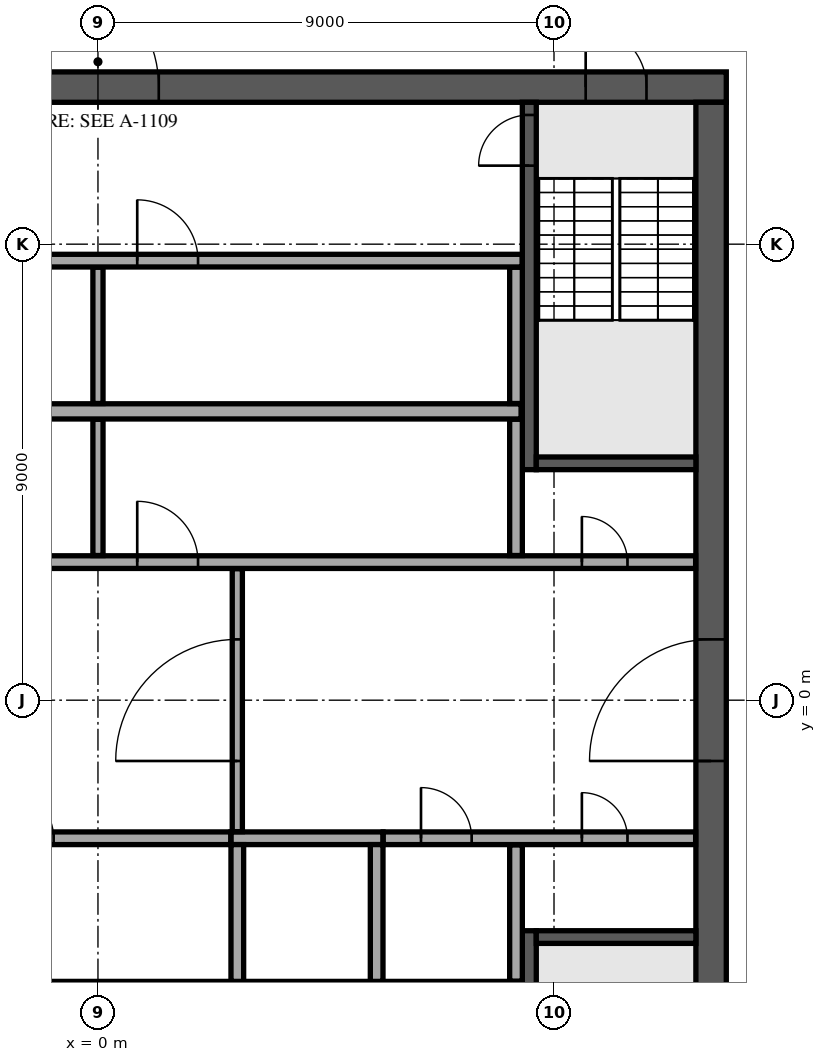
"""IFC4 building model, lengths in metres.
Left out: names, types, materials, properties, quantities, classifications, styles, units other than length and angle.
Written with IfcOpenShell. Run it as: python <this file> out.ifc"""

import sys

from ifc_helpers import new_model, si_unit, direction, frame, frame_2d, origin, place, context, subcontext, project, spatial, rectangle, extrude, element, fill, save


model = new_model("IFC4")
c1 = context("Model", 3, precision=1e-05, world=origin(), true_north=direction((0.0, 1.0)))
c2 = subcontext(c1, "Body", "Model", "MODEL_VIEW")
j1 = project(units=[si_unit("LENGTHUNIT", "METRE"), si_unit("PLANEANGLEUNIT", "RADIAN")], contexts=[c1])
p1 = place(None, origin())
s1 = spatial("IfcSite", under=j1, at=p1, CompositionType="ELEMENT")
p2 = place(p1, origin())
s2 = spatial("IfcBuilding", under=s1, at=p2, CompositionType="ELEMENT")
p3 = place(p2, frame((0.0, 0.0, 350.1)))
s3 = spatial("IfcBuildingStorey", under=s2, at=p3, CompositionType="ELEMENT", Elevation=350.1)
p4 = place(p3, frame((-12.4, 12.1, 0.0), z_axis=(0.0, 0.0, 1.0), x_axis=(1.0, 0.0, 0.0)))
e1 = element("IfcWall", 1, at=p4, inside=s3, PredefinedType="SHEAR", context=c2, shape_type="SweptSolid", body=[
    extrude(rectangle(XDim=24.8, YDim=0.6, at=frame_2d((12.4, 0.0))), origin(), (0.0, 0.0, 1.0), 7.7),
])
p5 = place(p4, frame((11.2, 0.0, 0.0)))
e2 = element("IfcOpeningElement", 2, at=p5, cuts=e1, PredefinedType="OPENING", context=c2, shape_type="SweptSolid", body=[
    extrude(rectangle(XDim=2.4, YDim=2.4, at=frame_2d((1.2, 1.2))), frame((0.0, 0.31, 0.0), z_axis=(0.0, -1.0, 0.0), x_axis=(1.0, 0.0, 0.0)), (0.0, 0.0, 1.0), 0.62),
])
p6 = place(p4, frame((22.025, 0.0, 0.0)))
e3 = element("IfcOpeningElement", 3, at=p6, cuts=e1, PredefinedType="OPENING", context=c2, shape_type="SweptSolid", body=[
    extrude(rectangle(XDim=1.2, YDim=2.1, at=frame_2d((0.6, 1.05))), frame((0.0, 0.31, 0.0), z_axis=(0.0, -1.0, 0.0), x_axis=(1.0, 0.0, 0.0)), (0.0, 0.0, 1.0), 0.62),
])
p7 = place(p4, frame((1.0, 0.0, 0.0)))
e4 = element("IfcOpeningElement", 4, at=p7, cuts=e1, PredefinedType="OPENING", context=c2, shape_type="SweptSolid", body=[
    extrude(rectangle(XDim=1.0, YDim=2.1, at=frame_2d((0.5, 1.05))), frame((0.0, 0.31, 0.0), z_axis=(0.0, -1.0, 0.0), x_axis=(1.0, 0.0, 0.0)), (0.0, 0.0, 1.0), 0.62),
])
p8 = place(p3, frame((12.1, -11.8, 0.0), z_axis=(0.0, 0.0, 1.0), x_axis=(0.0, 1.0, 0.0)))
e5 = element("IfcWall", 5, at=p8, inside=s3, PredefinedType="SHEAR", context=c2, shape_type="SweptSolid", body=[
    extrude(rectangle(XDim=23.6, YDim=0.6, at=frame_2d((11.8, 0.0))), origin(), (0.0, 0.0, 1.0), 7.7),
])
p9 = place(p8, frame((10.6, 0.0, 0.0)))
e6 = element("IfcOpeningElement", 6, at=p9, cuts=e5, PredefinedType="OPENING", context=c2, shape_type="SweptSolid", body=[
    extrude(rectangle(XDim=2.4, YDim=2.4, at=frame_2d((1.2, 1.2))), frame((0.0, 0.31, 0.0), z_axis=(0.0, -1.0, 0.0), x_axis=(1.0, 0.0, 0.0)), (0.0, 0.0, 1.0), 0.62),
])
p10 = place(p3, frame((-2.875, -5.7, 0.0), z_axis=(0.0, 0.0, 1.0), x_axis=(1.0, 0.0, 0.0)))
e7 = element("IfcWall", 7, at=p10, inside=s3, PredefinedType="SOLIDWALL", context=c2, shape_type="SweptSolid", body=[
    extrude(rectangle(XDim=11.25, YDim=0.3, at=frame_2d((5.625, 0.0))), origin(), (0.0, 0.0, 1.0), 7.7),
])
p11 = place(p3, frame((2.625, -2.725, 0.0), z_axis=(0.0, 0.0, 1.0), x_axis=(1.0, 0.0, 0.0)))
e8 = element("IfcWall", 8, at=p11, inside=s3, PredefinedType="SOLIDWALL", context=c2, shape_type="SweptSolid", body=[
    extrude(rectangle(XDim=3.0, YDim=0.25, at=frame_2d((1.5, 0.0))), origin(), (0.0, 0.0, 1.0), 7.7),
])
for number, where, z_axis, x_axis in (
    (9, (2.75, -5.55, 0.0), (0.0, 0.0, 1.0), (0.0, 1.0, 0.0)),
    (10, (5.5, -5.55, 0.0), (0.0, 0.0, 1.0), (0.0, 1.0, 0.0)),
):
    element("IfcWall", number, at=place(p3, frame(where, z_axis=z_axis, x_axis=x_axis)), inside=s3, PredefinedType="SOLIDWALL", context=c2, shape_type="SweptSolid", body=[
        extrude(rectangle(XDim=2.7, YDim=0.25, at=frame_2d((1.35, 0.0))), origin(), (0.0, 0.0, 1.0), 7.7),
    ])
p12 = place(p3, frame((8.512, 4.55, 0.0), z_axis=(0.0, 0.0, 1.0), x_axis=(0.0, 1.0, 0.0)))
e11 = element("IfcWall", 11, at=p12, inside=s3, PredefinedType="SOLIDWALL", context=c2, shape_type="SweptSolid", body=[
    extrude(rectangle(XDim=7.25, YDim=0.275, at=frame_2d((3.625, 0.0))), origin(), (0.0, 0.0, 1.0), 7.7),
])
p13 = place(p12, frame((6.0, 0.0, 0.0)))
e12 = element("IfcOpeningElement", 12, at=p13, cuts=e11, PredefinedType="OPENING", context=c2, shape_type="SweptSolid", body=[
    extrude(rectangle(XDim=1.0, YDim=2.1, at=frame_2d((0.5, 1.05))), frame((0.0, 0.147, 0.0), z_axis=(0.0, -1.0, 0.0), x_axis=(1.0, 0.0, 0.0)), (0.0, 0.0, 1.0), 0.295),
])
p14 = place(p3, frame((8.65, 4.675, 0.0), z_axis=(0.0, 0.0, 1.0), x_axis=(1.0, 0.0, 0.0)))
e13 = element("IfcWall", 13, at=p14, inside=s3, PredefinedType="SOLIDWALL", context=c2, shape_type="SweptSolid", body=[
    extrude(rectangle(XDim=3.15, YDim=0.25, at=frame_2d((1.575, 0.0))), origin(), (0.0, 0.0, 1.0), 7.7),
])
p15 = place(p3, frame((8.512, -4.55, 0.0), z_axis=(0.0, 0.0, 1.0), x_axis=(0.0, -1.0, 0.0)))
e14 = element("IfcWall", 14, at=p15, inside=s3, PredefinedType="SOLIDWALL", context=c2, shape_type="SweptSolid", body=[
    extrude(rectangle(XDim=7.25, YDim=0.275, at=frame_2d((3.625, 0.0))), origin(), (0.0, 0.0, 1.0), 7.7),
])
p16 = place(p15, frame((6.0, 0.0, 0.0)))
e15 = element("IfcOpeningElement", 15, at=p16, cuts=e14, PredefinedType="OPENING", context=c2, shape_type="SweptSolid", body=[
    extrude(rectangle(XDim=1.0, YDim=2.1, at=frame_2d((0.5, 1.05))), frame((0.0, 0.147, 0.0), z_axis=(0.0, -1.0, 0.0), x_axis=(1.0, 0.0, 0.0)), (0.0, 0.0, 1.0), 0.295),
])
p17 = place(p3, frame((8.65, -4.675, 0.0), z_axis=(0.0, 0.0, 1.0), x_axis=(1.0, 0.0, 0.0)))
e16 = element("IfcWall", 16, at=p17, inside=s3, PredefinedType="SOLIDWALL", context=c2, shape_type="SweptSolid", body=[
    extrude(rectangle(XDim=3.15, YDim=0.25, at=frame_2d((1.575, 0.0))), origin(), (0.0, 0.0, 1.0), 7.7),
])
p18 = place(p3, frame((8.25, -5.545, 0.0), z_axis=(0.0, 0.0, 1.0), x_axis=(0.0, 1.0, 0.0)))
e17 = element("IfcWall", 17, at=p18, inside=s3, PredefinedType="PARTITIONING", context=c2, shape_type="SweptSolid", body=[
    extrude(rectangle(XDim=2.69, YDim=0.25, at=frame_2d((1.345, 0.0))), origin(), (0.0, 0.0, 1.0), 7.7),
])
p19 = place(p3, frame((-11.795, -2.725, 0.0), z_axis=(0.0, 0.0, 1.0), x_axis=(1.0, 0.0, 0.0)))
e18 = element("IfcWall", 18, at=p19, inside=s3, PredefinedType="PARTITIONING", context=c2, shape_type="SweptSolid", body=[
    extrude(rectangle(XDim=14.415, YDim=0.25, at=frame_2d((7.208, 0.0))), origin(), (0.0, 0.0, 1.0), 7.7),
])
p20 = place(p19, frame((1.295, 0.0, 0.0)))
e19 = element("IfcOpeningElement", 19, at=p20, cuts=e18, PredefinedType="OPENING", context=c2, shape_type="SweptSolid", body=[
    extrude(rectangle(XDim=1.0, YDim=2.1, at=frame_2d((0.5, 1.05))), frame((0.0, 0.135, 0.0), z_axis=(0.0, -1.0, 0.0), x_axis=(1.0, 0.0, 0.0)), (0.0, 0.0, 1.0), 0.27),
])
p21 = place(p19, frame((4.42, 0.0, 0.0)))
e20 = element("IfcOpeningElement", 20, at=p21, cuts=e18, PredefinedType="OPENING", context=c2, shape_type="SweptSolid", body=[
    extrude(rectangle(XDim=1.0, YDim=2.1, at=frame_2d((0.5, 1.05))), frame((0.0, 0.135, 0.0), z_axis=(0.0, -1.0, 0.0), x_axis=(1.0, 0.0, 0.0)), (0.0, 0.0, 1.0), 0.27),
])
p22 = place(p19, frame((9.92, 0.0, 0.0)))
e21 = element("IfcOpeningElement", 21, at=p22, cuts=e18, PredefinedType="OPENING", context=c2, shape_type="SweptSolid", body=[
    extrude(rectangle(XDim=1.0, YDim=2.1, at=frame_2d((0.5, 1.05))), frame((0.0, 0.135, 0.0), z_axis=(0.0, -1.0, 0.0), x_axis=(1.0, 0.0, 0.0)), (0.0, 0.0, 1.0), 0.27),
])
p23 = place(p3, frame((5.63, -2.725, 0.0), z_axis=(0.0, 0.0, 1.0), x_axis=(1.0, 0.0, 0.0)))
e22 = element("IfcWall", 22, at=p23, inside=s3, PredefinedType="PARTITIONING", context=c2, shape_type="SweptSolid", body=[
    extrude(rectangle(XDim=6.165, YDim=0.25, at=frame_2d((3.083, 0.0))), origin(), (0.0, 0.0, 1.0), 7.7),
])
p24 = place(p23, frame((0.745, 0.0, 0.0)))
e23 = element("IfcOpeningElement", 23, at=p24, cuts=e22, PredefinedType="OPENING", context=c2, shape_type="SweptSolid", body=[
    extrude(rectangle(XDim=1.0, YDim=2.1, at=frame_2d((0.5, 1.05))), frame((0.0, 0.135, 0.0), z_axis=(0.0, -1.0, 0.0), x_axis=(1.0, 0.0, 0.0)), (0.0, 0.0, 1.0), 0.27),
])
p25 = place(p23, frame((3.92, 0.0, 0.0)))
e24 = element("IfcOpeningElement", 24, at=p25, cuts=e22, PredefinedType="OPENING", context=c2, shape_type="SweptSolid", body=[
    extrude(rectangle(XDim=0.9, YDim=2.1, at=frame_2d((0.45, 1.05))), frame((0.0, 0.135, 0.0), z_axis=(0.0, -1.0, 0.0), x_axis=(1.0, 0.0, 0.0)), (0.0, 0.0, 1.0), 0.27),
])
p26 = place(p3, frame((2.75, -2.595, 0.0), z_axis=(0.0, 0.0, 1.0), x_axis=(0.0, 1.0, 0.0)))
e25 = element("IfcWall", 25, at=p26, inside=s3, PredefinedType="PARTITIONING", context=c2, shape_type="SweptSolid", body=[
    extrude(rectangle(XDim=5.19, YDim=0.2, at=frame_2d((2.595, 0.0))), origin(), (0.0, 0.0, 1.0), 7.7),
])
p27 = place(p26, frame((1.395, 0.0, 0.0)))
e26 = element("IfcOpeningElement", 26, at=p27, cuts=e25, PredefinedType="OPENING", context=c2, shape_type="SweptSolid", body=[
    extrude(rectangle(XDim=2.4, YDim=2.4, at=frame_2d((1.2, 1.2))), frame((0.0, 0.11, 0.0), z_axis=(0.0, -1.0, 0.0), x_axis=(1.0, 0.0, 0.0)), (0.0, 0.0, 1.0), 0.22),
])
p28 = place(p3, frame((-11.795, 2.725, 0.0), z_axis=(0.0, 0.0, 1.0), x_axis=(1.0, 0.0, 0.0)))
e27 = element("IfcWall", 27, at=p28, inside=s3, PredefinedType="PARTITIONING", context=c2, shape_type="SweptSolid", body=[
    extrude(rectangle(XDim=23.59, YDim=0.25, at=frame_2d((11.795, 0.0))), origin(), (0.0, 0.0, 1.0), 7.7),
])
p29 = place(p28, frame((21.345, 0.0, 0.0)))
e28 = element("IfcOpeningElement", 28, at=p29, cuts=e27, PredefinedType="OPENING", context=c2, shape_type="SweptSolid", body=[
    extrude(rectangle(XDim=0.9, YDim=2.1, at=frame_2d((0.45, 1.05))), frame((0.0, 0.135, 0.0), z_axis=(0.0, -1.0, 0.0), x_axis=(1.0, 0.0, 0.0)), (0.0, 0.0, 1.0), 0.27),
])
p30 = place(p28, frame((1.345, 0.0, 0.0)))
e29 = element("IfcOpeningElement", 29, at=p30, cuts=e27, PredefinedType="OPENING", context=c2, shape_type="SweptSolid", body=[
    extrude(rectangle(XDim=0.9, YDim=2.1, at=frame_2d((0.45, 1.05))), frame((0.0, 0.135, 0.0), z_axis=(0.0, -1.0, 0.0), x_axis=(1.0, 0.0, 0.0)), (0.0, 0.0, 1.0), 0.27),
])
p31 = place(p28, frame((4.42, 0.0, 0.0)))
e30 = element("IfcOpeningElement", 30, at=p31, cuts=e27, PredefinedType="OPENING", context=c2, shape_type="SweptSolid", body=[
    extrude(rectangle(XDim=1.0, YDim=2.1, at=frame_2d((0.5, 1.05))), frame((0.0, 0.135, 0.0), z_axis=(0.0, -1.0, 0.0), x_axis=(1.0, 0.0, 0.0)), (0.0, 0.0, 1.0), 0.27),
])
p32 = place(p28, frame((7.17, 0.0, 0.0)))
e31 = element("IfcOpeningElement", 31, at=p32, cuts=e27, PredefinedType="OPENING", context=c2, shape_type="SweptSolid", body=[
    extrude(rectangle(XDim=1.0, YDim=2.1, at=frame_2d((0.5, 1.05))), frame((0.0, 0.135, 0.0), z_axis=(0.0, -1.0, 0.0), x_axis=(1.0, 0.0, 0.0)), (0.0, 0.0, 1.0), 0.27),
])
p33 = place(p28, frame((12.57, 0.0, 0.0)))
e32 = element("IfcOpeningElement", 32, at=p33, cuts=e27, PredefinedType="OPENING", context=c2, shape_type="SweptSolid", body=[
    extrude(rectangle(XDim=1.2, YDim=2.1, at=frame_2d((0.6, 1.05))), frame((0.0, 0.135, 0.0), z_axis=(0.0, -1.0, 0.0), x_axis=(1.0, 0.0, 0.0)), (0.0, 0.0, 1.0), 0.27),
])
p34 = place(p3, frame((0.0, 2.855, 0.0), z_axis=(0.0, 0.0, 1.0), x_axis=(0.0, 1.0, 0.0)))
e33 = element("IfcWall", 33, at=p34, inside=s3, PredefinedType="PARTITIONING", context=c2, shape_type="SweptSolid", body=[
    extrude(rectangle(XDim=2.69, YDim=0.2, at=frame_2d((1.345, 0.0))), origin(), (0.0, 0.0, 1.0), 7.7),
])
p35 = place(p3, frame((8.25, 2.855, 0.0), z_axis=(0.0, 0.0, 1.0), x_axis=(0.0, 1.0, 0.0)))
e34 = element("IfcWall", 34, at=p35, inside=s3, PredefinedType="PARTITIONING", context=c2, shape_type="SweptSolid", body=[
    extrude(rectangle(XDim=2.69, YDim=0.25, at=frame_2d((1.345, 0.0))), origin(), (0.0, 0.0, 1.0), 7.7),
])
p36 = place(p3, frame((-8.35, 5.7, 0.0), z_axis=(0.0, 0.0, 1.0), x_axis=(1.0, 0.0, 0.0)))
e35 = element("IfcWall", 35, at=p36, inside=s3, PredefinedType="PARTITIONING", context=c2, shape_type="SweptSolid", body=[
    extrude(rectangle(XDim=16.7, YDim=0.3, at=frame_2d((8.35, 0.0))), origin(), (0.0, 0.0, 1.0), 7.7),
])
p37 = place(p3, frame((0.0, 5.855, 0.0), z_axis=(0.0, 0.0, 1.0), x_axis=(0.0, 1.0, 0.0)))
e36 = element("IfcWall", 36, at=p37, inside=s3, PredefinedType="PARTITIONING", context=c2, shape_type="SweptSolid", body=[
    extrude(rectangle(XDim=2.69, YDim=0.2, at=frame_2d((1.345, 0.0))), origin(), (0.0, 0.0, 1.0), 7.7),
])
p38 = place(p3, frame((8.25, 5.855, 0.0), z_axis=(0.0, 0.0, 1.0), x_axis=(0.0, 1.0, 0.0)))
e37 = element("IfcWall", 37, at=p38, inside=s3, PredefinedType="PARTITIONING", context=c2, shape_type="SweptSolid", body=[
    extrude(rectangle(XDim=2.69, YDim=0.25, at=frame_2d((1.345, 0.0))), origin(), (0.0, 0.0, 1.0), 7.7),
])
p39 = place(p3, frame((-8.35, 8.675, 0.0), z_axis=(0.0, 0.0, 1.0), x_axis=(1.0, 0.0, 0.0)))
e38 = element("IfcWall", 38, at=p39, inside=s3, PredefinedType="PARTITIONING", context=c2, shape_type="SweptSolid", body=[
    extrude(rectangle(XDim=16.72, YDim=0.25, at=frame_2d((8.36, 0.0))), origin(), (0.0, 0.0, 1.0), 7.7),
])
p40 = place(p39, frame((0.975, 0.0, 0.0)))
e39 = element("IfcOpeningElement", 39, at=p40, cuts=e38, PredefinedType="OPENING", context=c2, shape_type="SweptSolid", body=[
    extrude(rectangle(XDim=1.0, YDim=2.1, at=frame_2d((0.5, 1.05))), frame((0.0, 0.135, 0.0), z_axis=(0.0, -1.0, 0.0), x_axis=(1.0, 0.0, 0.0)), (0.0, 0.0, 1.0), 0.27),
])
p41 = place(p39, frame((3.725, 0.0, 0.0)))
e40 = element("IfcOpeningElement", 40, at=p41, cuts=e38, PredefinedType="OPENING", context=c2, shape_type="SweptSolid", body=[
    extrude(rectangle(XDim=1.0, YDim=2.1, at=frame_2d((0.5, 1.05))), frame((0.0, 0.135, 0.0), z_axis=(0.0, -1.0, 0.0), x_axis=(1.0, 0.0, 0.0)), (0.0, 0.0, 1.0), 0.27),
])
p42 = place(p39, frame((9.125, 0.0, 0.0)))
e41 = element("IfcOpeningElement", 41, at=p42, cuts=e38, PredefinedType="OPENING", context=c2, shape_type="SweptSolid", body=[
    extrude(rectangle(XDim=1.2, YDim=2.1, at=frame_2d((0.6, 1.05))), frame((0.0, 0.135, 0.0), z_axis=(0.0, -1.0, 0.0), x_axis=(1.0, 0.0, 0.0)), (0.0, 0.0, 1.0), 0.27),
])
p43 = place(p5, origin())
e42 = element("IfcDoor", 42, at=p43, inside=s3, OperationType="SINGLE_SWING_LEFT", PredefinedType="DOOR", context=c2, shape_type="SweptSolid", body=[
    extrude(rectangle(XDim=2.4, YDim=2.4, at=frame_2d((1.2, 1.2))), frame((0.0, 0.025, 0.0), z_axis=(0.0, -1.0, 0.0), x_axis=(1.0, 0.0, 0.0)), (0.0, 0.0, 1.0), 0.05),
])
fill(e2, e42)
p44 = place(p6, origin())
e43 = element("IfcDoor", 43, at=p44, inside=s3, OperationType="SINGLE_SWING_LEFT", PredefinedType="DOOR", context=c2, shape_type="SweptSolid", body=[
    extrude(rectangle(XDim=1.2, YDim=2.1, at=frame_2d((0.6, 1.05))), frame((0.0, 0.025, 0.0), z_axis=(0.0, -1.0, 0.0), x_axis=(1.0, 0.0, 0.0)), (0.0, 0.0, 1.0), 0.05),
])
fill(e3, e43)
p45 = place(p9, origin())
e44 = element("IfcDoor", 44, at=p45, inside=s3, OperationType="SINGLE_SWING_LEFT", PredefinedType="DOOR", context=c2, shape_type="SweptSolid", body=[
    extrude(rectangle(XDim=2.4, YDim=2.4, at=frame_2d((1.2, 1.2))), frame((0.0, 0.025, 0.0), z_axis=(0.0, -1.0, 0.0), x_axis=(1.0, 0.0, 0.0)), (0.0, 0.0, 1.0), 0.05),
])
fill(e6, e44)
p46 = place(p13, origin())
e45 = element("IfcDoor", 45, at=p46, inside=s3, OperationType="SINGLE_SWING_LEFT", PredefinedType="DOOR", context=c2, shape_type="SweptSolid", body=[
    extrude(rectangle(XDim=1.0, YDim=2.1, at=frame_2d((0.5, 1.05))), frame((0.0, 0.025, 0.0), z_axis=(0.0, -1.0, 0.0), x_axis=(1.0, 0.0, 0.0)), (0.0, 0.0, 1.0), 0.05),
])
fill(e12, e45)
p47 = place(p24, origin())
e46 = element("IfcDoor", 46, at=p47, inside=s3, OperationType="SINGLE_SWING_RIGHT", PredefinedType="DOOR", context=c2, shape_type="SweptSolid", body=[
    extrude(rectangle(XDim=1.0, YDim=2.1, at=frame_2d((0.5, 1.05))), frame((0.0, 0.025, 0.0), z_axis=(0.0, -1.0, 0.0), x_axis=(1.0, 0.0, 0.0)), (0.0, 0.0, 1.0), 0.05),
])
fill(e23, e46)
p48 = place(p29, origin())
e47 = element("IfcDoor", 47, at=p48, inside=s3, OperationType="SINGLE_SWING_RIGHT", PredefinedType="DOOR", context=c2, shape_type="SweptSolid", body=[
    extrude(rectangle(XDim=0.9, YDim=2.1, at=frame_2d((0.45, 1.05))), frame((0.0, 0.025, 0.0), z_axis=(0.0, -1.0, 0.0), x_axis=(1.0, 0.0, 0.0)), (0.0, 0.0, 1.0), 0.05),
])
fill(e28, e47)
p49 = place(p25, origin())
e48 = element("IfcDoor", 48, at=p49, inside=s3, OperationType="SINGLE_SWING_RIGHT", PredefinedType="DOOR", context=c2, shape_type="SweptSolid", body=[
    extrude(rectangle(XDim=0.9, YDim=2.1, at=frame_2d((0.45, 1.05))), frame((0.0, 0.025, 0.0), z_axis=(0.0, -1.0, 0.0), x_axis=(1.0, 0.0, 0.0)), (0.0, 0.0, 1.0), 0.05),
])
fill(e24, e48)
p50 = place(p33, origin())
e49 = element("IfcDoor", 49, at=p50, inside=s3, OperationType="SINGLE_SWING_LEFT", PredefinedType="DOOR", context=c2, shape_type="SweptSolid", body=[
    extrude(rectangle(XDim=1.2, YDim=2.1, at=frame_2d((0.6, 1.05))), frame((0.0, 0.025, 0.0), z_axis=(0.0, -1.0, 0.0), x_axis=(1.0, 0.0, 0.0)), (0.0, 0.0, 1.0), 0.05),
])
fill(e32, e49)
p51 = place(p42, origin())
e50 = element("IfcDoor", 50, at=p51, inside=s3, OperationType="SINGLE_SWING_LEFT", PredefinedType="DOOR", context=c2, shape_type="SweptSolid", body=[
    extrude(rectangle(XDim=1.2, YDim=2.1, at=frame_2d((0.6, 1.05))), frame((0.0, 0.025, 0.0), z_axis=(0.0, -1.0, 0.0), x_axis=(1.0, 0.0, 0.0)), (0.0, 0.0, 1.0), 0.05),
])
fill(e41, e50)
p52 = place(p22, origin())
e51 = element("IfcDoor", 51, at=p52, inside=s3, OperationType="SINGLE_SWING_RIGHT", PredefinedType="DOOR", context=c2, shape_type="SweptSolid", body=[
    extrude(rectangle(XDim=1.0, YDim=2.1, at=frame_2d((0.5, 1.05))), frame((0.0, 0.025, 0.0), z_axis=(0.0, -1.0, 0.0), x_axis=(1.0, 0.0, 0.0)), (0.0, 0.0, 1.0), 0.05),
])
fill(e21, e51)
p53 = place(p27, origin())
e52 = element("IfcDoor", 52, at=p53, inside=s3, OperationType="DOUBLE_DOOR_DOUBLE_SWING", PredefinedType="DOOR", context=c2, shape_type="SweptSolid", body=[
    extrude(rectangle(XDim=2.4, YDim=2.4, at=frame_2d((1.2, 1.2))), frame((0.0, 0.025, 0.0), z_axis=(0.0, -1.0, 0.0), x_axis=(1.0, 0.0, 0.0)), (0.0, 0.0, 1.0), 0.05),
])
fill(e26, e52)
save(model, sys.argv[1])
